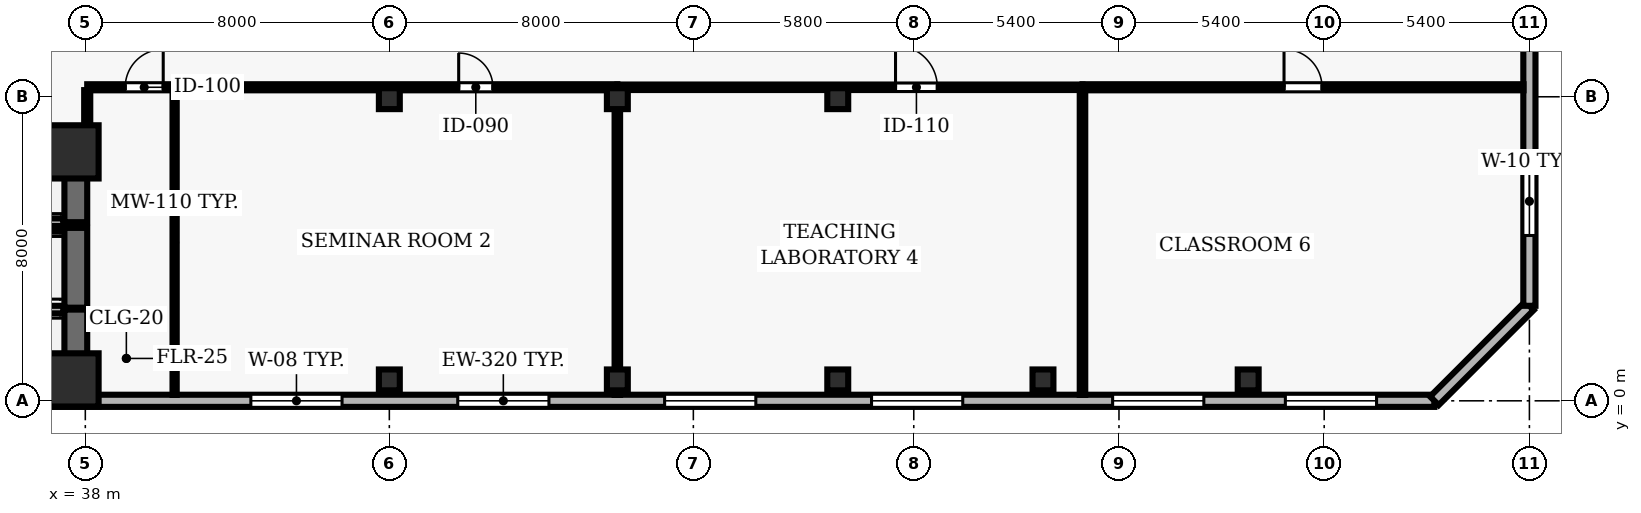
"""IFC4 building model, lengths in metres.
Left out: names, types, materials, properties, quantities, classifications, styles, units other than length and angle.
Written with IfcOpenShell. Run it as: python <this file> out.ifc"""

import sys

from ifc_helpers import new_model, si_unit, direction, frame, frame_2d, origin, origin_2d, place, context, subcontext, project, spatial, rectangle, hollow_rectangle, extrude, element, fill, save


model = new_model("IFC4")
c1 = context("Model", 3, precision=1e-05, world=origin(), true_north=direction((0.0, 1.0)))
c2 = subcontext(c1, "Body", "Model", "MODEL_VIEW")
j1 = project(units=[si_unit("LENGTHUNIT", "METRE"), si_unit("PLANEANGLEUNIT", "RADIAN")], contexts=[c1])
p1 = place(None, origin())
s1 = spatial("IfcSite", under=j1, at=p1, CompositionType="ELEMENT")
p2 = place(p1, origin())
s2 = spatial("IfcBuilding", under=s1, at=p2, CompositionType="ELEMENT")
p3 = place(p2, frame((0.0, 0.0, 34.9)))
s3 = spatial("IfcBuildingStorey", under=s2, at=p3, CompositionType="ELEMENT", Elevation=34.9)
for number, where, z_axis, x_axis in (
    (1, (37.65, 0.55, 0.0), (0.0, 0.0, 1.0), (1.0, 0.0, 0.0)),
    (2, (37.65, 6.55, 0.0), (0.0, 0.0, 1.0), (1.0, 0.0, 0.0)),
):
    element("IfcColumn", number, at=place(p3, frame(where, z_axis=z_axis, x_axis=x_axis)), inside=s3, PredefinedType="COLUMN", context=c2, shape_type="SweptSolid", body=[
        extrude(rectangle(XDim=1.4, YDim=1.4, at=origin_2d()), origin(), (0.0, 0.0, 1.0), 3.9),
    ])
for number, where, z_axis, x_axis in (
    (3, (46.0, 0.55, 0.0), (0.0, 0.0, 1.0), (1.0, 0.0, 0.0)),
    (4, (46.0, 7.95, 0.0), (0.0, 0.0, 1.0), (1.0, 0.0, 0.0)),
    (5, (52.0, 0.55, 0.0), (0.0, 0.0, 1.0), (1.0, 0.0, 0.0)),
    (6, (52.0, 7.95, 0.0), (0.0, 0.0, 1.0), (1.0, 0.0, 0.0)),
    (7, (57.8, 0.55, 0.0), (0.0, 0.0, 1.0), (1.0, 0.0, 0.0)),
    (8, (57.8, 7.95, 0.0), (0.0, 0.0, 1.0), (1.0, 0.0, 0.0)),
    (9, (63.2, 0.55, 0.0), (0.0, 0.0, 1.0), (1.0, 0.0, 0.0)),
    (10, (68.6, 0.55, 0.0), (0.0, 0.0, 1.0), (1.0, 0.0, 0.0)),
):
    element("IfcColumn", number, at=place(p3, frame(where, z_axis=z_axis, x_axis=x_axis)), inside=s3, PredefinedType="COLUMN", context=c2, shape_type="SweptSolid", body=[
        extrude(hollow_rectangle(XDim=0.55, YDim=0.55, WallThickness=0.025, at=origin_2d()), origin(), (0.0, 0.0, 1.0), 3.9),
    ])
p4 = place(p3, frame((24.5, 0.0, 0.0), z_axis=(0.0, 0.0, 1.0), x_axis=(1.0, 0.0, 0.0)))
e11 = element("IfcWall", 11, at=p4, inside=s3, PredefinedType="SOLIDWALL", context=c2, shape_type="SweptSolid", body=[
    extrude(rectangle(XDim=49.0, YDim=0.32, at=frame_2d((24.5, 0.0))), origin(), (0.0, 0.0, 1.0), 3.69),
])
p5 = place(p4, frame((1.522, 0.0, 0.9)))
e12 = element("IfcOpeningElement", 12, at=p5, cuts=e11, PredefinedType="OPENING", context=c2, shape_type="SweptSolid", body=[
    extrude(rectangle(XDim=2.4, YDim=1.8, at=frame_2d((1.2, 0.9))), frame((0.0, 0.17, 0.0), z_axis=(0.0, -1.0, 0.0), x_axis=(1.0, 0.0, 0.0)), (0.0, 0.0, 1.0), 0.34),
])
p6 = place(p4, frame((17.856, 0.0, 0.9)))
e13 = element("IfcOpeningElement", 13, at=p6, cuts=e11, PredefinedType="OPENING", context=c2, shape_type="SweptSolid", body=[
    extrude(rectangle(XDim=2.4, YDim=1.8, at=frame_2d((1.2, 0.9))), frame((0.0, 0.17, 0.0), z_axis=(0.0, -1.0, 0.0), x_axis=(1.0, 0.0, 0.0)), (0.0, 0.0, 1.0), 0.34),
])
p7 = place(p4, frame((23.3, 0.0, 0.9)))
e14 = element("IfcOpeningElement", 14, at=p7, cuts=e11, PredefinedType="OPENING", context=c2, shape_type="SweptSolid", body=[
    extrude(rectangle(XDim=2.4, YDim=1.8, at=frame_2d((1.2, 0.9))), frame((0.0, 0.17, 0.0), z_axis=(0.0, -1.0, 0.0), x_axis=(1.0, 0.0, 0.0)), (0.0, 0.0, 1.0), 0.34),
])
p8 = place(p4, frame((28.744, 0.0, 0.9)))
e15 = element("IfcOpeningElement", 15, at=p8, cuts=e11, PredefinedType="OPENING", context=c2, shape_type="SweptSolid", body=[
    extrude(rectangle(XDim=2.4, YDim=1.8, at=frame_2d((1.2, 0.9))), frame((0.0, 0.17, 0.0), z_axis=(0.0, -1.0, 0.0), x_axis=(1.0, 0.0, 0.0)), (0.0, 0.0, 1.0), 0.34),
])
p9 = place(p4, frame((34.189, 0.0, 0.9)))
e16 = element("IfcOpeningElement", 16, at=p9, cuts=e11, PredefinedType="OPENING", context=c2, shape_type="SweptSolid", body=[
    extrude(rectangle(XDim=2.4, YDim=1.8, at=frame_2d((1.2, 0.9))), frame((0.0, 0.17, 0.0), z_axis=(0.0, -1.0, 0.0), x_axis=(1.0, 0.0, 0.0)), (0.0, 0.0, 1.0), 0.34),
])
p10 = place(p4, frame((40.533, 0.0, 0.9)))
e17 = element("IfcOpeningElement", 17, at=p10, cuts=e11, PredefinedType="OPENING", context=c2, shape_type="SweptSolid", body=[
    extrude(rectangle(XDim=2.4, YDim=1.8, at=frame_2d((1.2, 0.9))), frame((0.0, 0.17, 0.0), z_axis=(0.0, -1.0, 0.0), x_axis=(1.0, 0.0, 0.0)), (0.0, 0.0, 1.0), 0.34),
])
p11 = place(p4, frame((45.078, 0.0, 0.9)))
e18 = element("IfcOpeningElement", 18, at=p11, cuts=e11, PredefinedType="OPENING", context=c2, shape_type="SweptSolid", body=[
    extrude(rectangle(XDim=2.4, YDim=1.8, at=frame_2d((1.2, 0.9))), frame((0.0, 0.17, 0.0), z_axis=(0.0, -1.0, 0.0), x_axis=(1.0, 0.0, 0.0)), (0.0, 0.0, 1.0), 0.34),
])
p12 = place(p3, frame((73.5, 0.0, 0.0), z_axis=(0.0, 0.0, 1.0), x_axis=(0.707106781187, 0.707106781187, 0.0)))
e19 = element("IfcWall", 19, at=p12, inside=s3, PredefinedType="SOLIDWALL", context=c2, shape_type="SweptSolid", body=[
    extrude(rectangle(XDim=3.536, YDim=0.32, at=frame_2d((1.768, 0.0))), origin(), (0.0, 0.0, 1.0), 3.69),
])
p13 = place(p3, frame((76.0, 2.5, 0.0), z_axis=(0.0, 0.0, 1.0), x_axis=(0.0, 1.0, 0.0)))
e20 = element("IfcWall", 20, at=p13, inside=s3, PredefinedType="SOLIDWALL", context=c2, shape_type="SweptSolid", body=[
    extrude(rectangle(XDim=11.0, YDim=0.32, at=frame_2d((5.5, 0.0))), origin(), (0.0, 0.0, 1.0), 3.69),
])
p14 = place(p13, frame((1.85, 0.0, 0.9)))
e21 = element("IfcOpeningElement", 21, at=p14, cuts=e20, PredefinedType="OPENING", context=c2, shape_type="SweptSolid", body=[
    extrude(rectangle(XDim=1.8, YDim=2.2, at=frame_2d((0.9, 1.1))), frame((0.0, 0.17, 0.0), z_axis=(0.0, -1.0, 0.0), x_axis=(1.0, 0.0, 0.0)), (0.0, 0.0, 1.0), 0.34),
])
p15 = place(p3, frame((37.75, 0.3, 0.0), z_axis=(0.0, 0.0, 1.0), x_axis=(0.0, 1.0, 0.0)))
e22 = element("IfcWall", 22, at=p15, inside=s3, PredefinedType="SHEAR", context=c2, shape_type="SweptSolid", body=[
    extrude(rectangle(XDim=2.1, YDim=0.6, at=frame_2d((1.05, 0.0))), origin(), (0.0, 0.0, 1.0), 3.69),
])
for number, where, z_axis, x_axis in (
    (23, (35.28, 0.3, 0.0), (0.0, 0.0, 1.0), (1.0, 0.0, 0.0)),
    (24, (37.42, 2.4, 0.0), (0.0, 0.0, 1.0), (-1.0, 0.0, 0.0)),
):
    element("IfcWall", number, at=place(p3, frame(where, z_axis=z_axis, x_axis=x_axis)), inside=s3, PredefinedType="SOLIDWALL", context=c2, shape_type="SweptSolid", body=[
        extrude(rectangle(XDim=2.14, YDim=0.2, at=frame_2d((1.07, 0.0))), origin(), (0.0, 0.0, 1.0), 3.69),
    ])
p16 = place(p3, frame((37.75, 2.45, 0.0), z_axis=(0.0, 0.0, 1.0), x_axis=(0.0, 1.0, 0.0)))
e25 = element("IfcWall", 25, at=p16, inside=s3, PredefinedType="SHEAR", context=c2, shape_type="SweptSolid", body=[
    extrude(rectangle(XDim=2.1, YDim=0.6, at=frame_2d((1.05, 0.0))), origin(), (0.0, 0.0, 1.0), 3.69),
])
p17 = place(p3, frame((37.42, 4.55, 0.0), z_axis=(0.0, 0.0, 1.0), x_axis=(-1.0, 0.0, 0.0)))
e26 = element("IfcWall", 26, at=p17, inside=s3, PredefinedType="SOLIDWALL", context=c2, shape_type="SweptSolid", body=[
    extrude(rectangle(XDim=2.14, YDim=0.2, at=frame_2d((1.07, 0.0))), origin(), (0.0, 0.0, 1.0), 3.69),
])
p18 = place(p3, frame((37.75, 4.7, 0.0), z_axis=(0.0, 0.0, 1.0), x_axis=(0.0, 1.0, 0.0)))
e27 = element("IfcWall", 27, at=p18, inside=s3, PredefinedType="SHEAR", context=c2, shape_type="SweptSolid", body=[
    extrude(rectangle(XDim=2.25, YDim=0.6, at=frame_2d((1.125, 0.0))), origin(), (0.0, 0.0, 1.0), 3.69),
])
for number, where, z_axis, x_axis in (
    (28, (35.28, 4.7, 0.0), (0.0, 0.0, 1.0), (1.0, 0.0, 0.0)),
    (29, (37.42, 6.95, 0.0), (0.0, 0.0, 1.0), (-1.0, 0.0, 0.0)),
):
    element("IfcWall", number, at=place(p3, frame(where, z_axis=z_axis, x_axis=x_axis)), inside=s3, PredefinedType="SOLIDWALL", context=c2, shape_type="SweptSolid", body=[
        extrude(rectangle(XDim=2.14, YDim=0.2, at=frame_2d((1.07, 0.0))), origin(), (0.0, 0.0, 1.0), 3.69),
    ])
p19 = place(p3, frame((38.05, 8.25, 0.0), z_axis=(0.0, 0.0, 1.0), x_axis=(1.0, 0.0, 0.0)))
e30 = element("IfcWall", 30, at=p19, inside=s3, PredefinedType="PARTITIONING", context=c2, shape_type="SweptSolid", body=[
    extrude(rectangle(XDim=2.3, YDim=0.16, at=frame_2d((1.15, 0.0))), origin(), (0.0, 0.0, 1.0), 3.055),
])
p20 = place(p19, frame((1.0, 0.0, 0.0)))
e31 = element("IfcOpeningElement", 31, at=p20, cuts=e30, PredefinedType="OPENING", context=c2, shape_type="SweptSolid", body=[
    extrude(rectangle(XDim=1.0, YDim=2.1, at=frame_2d((0.5, 1.05))), frame((0.0, 0.09, 0.0), z_axis=(0.0, -1.0, 0.0), x_axis=(1.0, 0.0, 0.0)), (0.0, 0.0, 1.0), 0.18),
])
p21 = place(p3, frame((40.35, 8.25, 0.0), z_axis=(0.0, 0.0, 1.0), x_axis=(1.0, 0.0, 0.0)))
e32 = element("IfcWall", 32, at=p21, inside=s3, PredefinedType="PARTITIONING", context=c2, shape_type="SweptSolid", body=[
    extrude(rectangle(XDim=11.65, YDim=0.16, at=frame_2d((5.825, 0.0))), origin(), (0.0, 0.0, 1.0), 3.055),
])
p22 = place(p21, frame((7.475, 0.0, 0.0)))
e33 = element("IfcOpeningElement", 33, at=p22, cuts=e32, PredefinedType="OPENING", context=c2, shape_type="SweptSolid", body=[
    extrude(rectangle(XDim=0.9, YDim=2.1, at=frame_2d((0.45, 1.05))), frame((0.0, 0.09, 0.0), z_axis=(0.0, -1.0, 0.0), x_axis=(1.0, 0.0, 0.0)), (0.0, 0.0, 1.0), 0.18),
])
p23 = place(p3, frame((52.0, 8.25, 0.0), z_axis=(0.0, 0.0, 1.0), x_axis=(1.0, 0.0, 0.0)))
e34 = element("IfcWall", 34, at=p23, inside=s3, PredefinedType="PARTITIONING", context=c2, shape_type="SweptSolid", body=[
    extrude(rectangle(XDim=12.24, YDim=0.145, at=frame_2d((6.12, 0.0))), origin(), (0.0, 0.0, 1.0), 3.055),
])
p24 = place(p23, frame((7.32, 0.0, 0.0)))
e35 = element("IfcOpeningElement", 35, at=p24, cuts=e34, PredefinedType="OPENING", context=c2, shape_type="SweptSolid", body=[
    extrude(rectangle(XDim=1.1, YDim=2.15, at=frame_2d((0.55, 1.075))), frame((0.0, 0.083, 0.0), z_axis=(0.0, -1.0, 0.0), x_axis=(1.0, 0.0, 0.0)), (0.0, 0.0, 1.0), 0.165),
])
p25 = place(p3, frame((64.24, 8.25, 0.0), z_axis=(0.0, 0.0, 1.0), x_axis=(1.0, 0.0, 0.0)))
e36 = element("IfcWall", 36, at=p25, inside=s3, PredefinedType="PARTITIONING", context=c2, shape_type="SweptSolid", body=[
    extrude(rectangle(XDim=11.605, YDim=0.16, at=frame_2d((5.802, 0.0))), origin(), (0.0, 0.0, 1.0), 3.69),
])
p26 = place(p25, frame((5.303, 0.0, 0.0)))
e37 = element("IfcOpeningElement", 37, at=p26, cuts=e36, PredefinedType="OPENING", context=c2, shape_type="SweptSolid", body=[
    extrude(rectangle(XDim=1.0, YDim=2.1, at=frame_2d((0.5, 1.05))), frame((0.0, 0.09, 0.0), z_axis=(0.0, -1.0, 0.0), x_axis=(1.0, 0.0, 0.0)), (0.0, 0.0, 1.0), 0.18),
])
p27 = place(p3, frame((38.05, 7.05, 0.0), z_axis=(0.0, 0.0, 1.0), x_axis=(0.0, 1.0, 0.0)))
e38 = element("IfcWall", 38, at=p27, inside=s3, PredefinedType="PARTITIONING", context=c2, shape_type="SweptSolid", body=[
    extrude(rectangle(XDim=1.125, YDim=0.16, at=frame_2d((0.562, 0.0))), origin(), (0.0, 0.0, 1.0), 3.055),
])
p28 = place(p3, frame((40.35, 0.155, 0.0), z_axis=(0.0, 0.0, 1.0), x_axis=(0.0, 1.0, 0.0)))
e39 = element("IfcWall", 39, at=p28, inside=s3, PredefinedType="MOVABLE", context=c2, shape_type="SweptSolid", body=[
    extrude(rectangle(XDim=8.02, YDim=0.11, at=frame_2d((4.01, 0.0))), origin(), (0.0, 0.0, 1.0), 3.69),
])
p29 = place(p3, frame((52.0, 0.155, 0.0), z_axis=(0.0, 0.0, 1.0), x_axis=(0.0, 1.0, 0.0)))
e40 = element("IfcWall", 40, at=p29, inside=s3, PredefinedType="PARTITIONING", context=c2, shape_type="SweptSolid", body=[
    extrude(rectangle(XDim=8.02, YDim=0.145, at=frame_2d((4.01, 0.0))), origin(), (0.0, 0.0, 1.0), 3.055),
])
p30 = place(p3, frame((64.24, 0.155, 0.0), z_axis=(0.0, 0.0, 1.0), x_axis=(0.0, 1.0, 0.0)))
e41 = element("IfcWall", 41, at=p30, inside=s3, PredefinedType="PARTITIONING", context=c2, shape_type="SweptSolid", body=[
    extrude(rectangle(XDim=8.02, YDim=0.145, at=frame_2d((4.01, 0.0))), origin(), (0.0, 0.0, 1.0), 3.69),
])
p31 = place(p6, origin())
e42 = element("IfcWindow", 42, at=p31, inside=s3, PartitioningType="SINGLE_PANEL", PredefinedType="WINDOW", context=c2, shape_type="SweptSolid", body=[
    extrude(rectangle(XDim=2.4, YDim=1.8, at=frame_2d((1.2, 0.9))), frame((0.0, 0.03, 0.0), z_axis=(0.0, -1.0, 0.0), x_axis=(1.0, 0.0, 0.0)), (0.0, 0.0, 1.0), 0.06),
])
fill(e13, e42)
p32 = place(p7, origin())
e43 = element("IfcWindow", 43, at=p32, inside=s3, PartitioningType="SINGLE_PANEL", PredefinedType="WINDOW", context=c2, shape_type="SweptSolid", body=[
    extrude(rectangle(XDim=2.4, YDim=1.8, at=frame_2d((1.2, 0.9))), frame((0.0, 0.03, 0.0), z_axis=(0.0, -1.0, 0.0), x_axis=(1.0, 0.0, 0.0)), (0.0, 0.0, 1.0), 0.06),
])
fill(e14, e43)
p33 = place(p8, origin())
e44 = element("IfcWindow", 44, at=p33, inside=s3, PartitioningType="SINGLE_PANEL", PredefinedType="WINDOW", context=c2, shape_type="SweptSolid", body=[
    extrude(rectangle(XDim=2.4, YDim=1.8, at=frame_2d((1.2, 0.9))), frame((0.0, 0.03, 0.0), z_axis=(0.0, -1.0, 0.0), x_axis=(1.0, 0.0, 0.0)), (0.0, 0.0, 1.0), 0.06),
])
fill(e15, e44)
p34 = place(p9, origin())
e45 = element("IfcWindow", 45, at=p34, inside=s3, PartitioningType="SINGLE_PANEL", PredefinedType="WINDOW", context=c2, shape_type="SweptSolid", body=[
    extrude(rectangle(XDim=2.4, YDim=1.8, at=frame_2d((1.2, 0.9))), frame((0.0, 0.03, 0.0), z_axis=(0.0, -1.0, 0.0), x_axis=(1.0, 0.0, 0.0)), (0.0, 0.0, 1.0), 0.06),
])
fill(e16, e45)
p35 = place(p10, origin())
e46 = element("IfcWindow", 46, at=p35, inside=s3, PartitioningType="SINGLE_PANEL", PredefinedType="WINDOW", context=c2, shape_type="SweptSolid", body=[
    extrude(rectangle(XDim=2.4, YDim=1.8, at=frame_2d((1.2, 0.9))), frame((0.0, 0.03, 0.0), z_axis=(0.0, -1.0, 0.0), x_axis=(1.0, 0.0, 0.0)), (0.0, 0.0, 1.0), 0.06),
])
fill(e17, e46)
p36 = place(p11, origin())
e47 = element("IfcWindow", 47, at=p36, inside=s3, PartitioningType="SINGLE_PANEL", PredefinedType="WINDOW", context=c2, shape_type="SweptSolid", body=[
    extrude(rectangle(XDim=2.4, YDim=1.8, at=frame_2d((1.2, 0.9))), frame((0.0, 0.03, 0.0), z_axis=(0.0, -1.0, 0.0), x_axis=(1.0, 0.0, 0.0)), (0.0, 0.0, 1.0), 0.06),
])
fill(e18, e47)
p37 = place(p14, origin())
e48 = element("IfcWindow", 48, at=p37, inside=s3, PartitioningType="SINGLE_PANEL", PredefinedType="WINDOW", context=c2, shape_type="SweptSolid", body=[
    extrude(rectangle(XDim=1.8, YDim=2.2, at=frame_2d((0.9, 1.1))), frame((0.0, 0.03, 0.0), z_axis=(0.0, -1.0, 0.0), x_axis=(1.0, 0.0, 0.0)), (0.0, 0.0, 1.0), 0.06),
])
fill(e21, e48)
p38 = place(p20, origin())
e49 = element("IfcDoor", 49, at=p38, inside=s3, OperationType="SINGLE_SWING_RIGHT", PredefinedType="DOOR", context=c2, shape_type="SweptSolid", body=[
    extrude(rectangle(XDim=1.0, YDim=2.1, at=frame_2d((0.5, 1.05))), frame((0.0, 0.025, 0.0), z_axis=(0.0, -1.0, 0.0), x_axis=(1.0, 0.0, 0.0)), (0.0, 0.0, 1.0), 0.05),
])
fill(e31, e49)
p39 = place(p22, origin())
e50 = element("IfcDoor", 50, at=p39, inside=s3, OperationType="SINGLE_SWING_LEFT", PredefinedType="DOOR", context=c2, shape_type="SweptSolid", body=[
    extrude(rectangle(XDim=0.9, YDim=2.1, at=frame_2d((0.45, 1.05))), frame((0.0, 0.025, 0.0), z_axis=(0.0, -1.0, 0.0), x_axis=(1.0, 0.0, 0.0)), (0.0, 0.0, 1.0), 0.05),
])
fill(e33, e50)
p40 = place(p24, origin())
e51 = element("IfcDoor", 51, at=p40, inside=s3, OperationType="SINGLE_SWING_LEFT", PredefinedType="DOOR", context=c2, shape_type="SweptSolid", body=[
    extrude(rectangle(XDim=1.1, YDim=2.15, at=frame_2d((0.55, 1.075))), frame((0.0, 0.025, 0.0), z_axis=(0.0, -1.0, 0.0), x_axis=(1.0, 0.0, 0.0)), (0.0, 0.0, 1.0), 0.05),
])
fill(e35, e51)
p41 = place(p26, origin())
e52 = element("IfcDoor", 52, at=p41, inside=s3, OperationType="SINGLE_SWING_LEFT", PredefinedType="DOOR", context=c2, shape_type="SweptSolid", body=[
    extrude(rectangle(XDim=1.0, YDim=2.1, at=frame_2d((0.5, 1.05))), frame((0.0, 0.025, 0.0), z_axis=(0.0, -1.0, 0.0), x_axis=(1.0, 0.0, 0.0)), (0.0, 0.0, 1.0), 0.05),
])
fill(e37, e52)
save(model, sys.argv[1])
